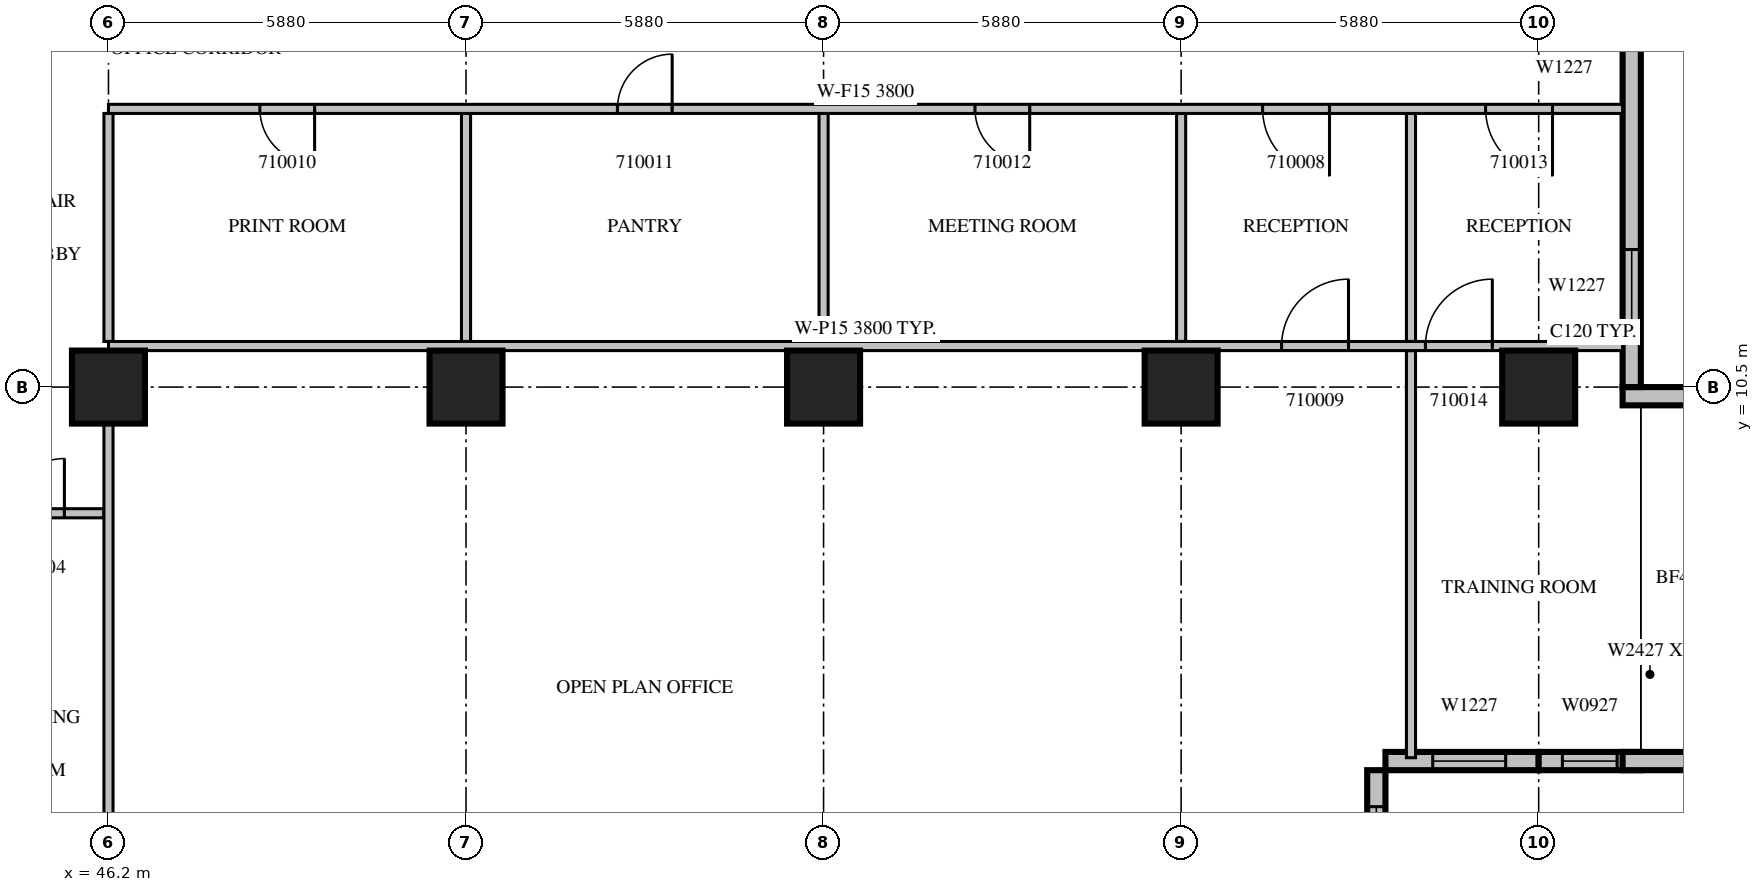
"""IFC4 building model, lengths in metres.
Left out: names, types, materials, properties, quantities, classifications, styles, units other than length and angle.
Written with IfcOpenShell. Run it as: python <this file> out.ifc"""

import sys

from ifc_helpers import new_model, si_unit, direction, frame, frame_2d, origin, origin_2d, place, context, subcontext, project, spatial, rectangle, extrude, source, transform, mapped, element, fill, save


model = new_model("IFC4")
c1 = context("Model", 3, precision=1e-05, world=origin(), true_north=direction((0.0, 1.0)))
c2 = subcontext(c1, "Body", "Model", "MODEL_VIEW")
j1 = project(units=[si_unit("LENGTHUNIT", "METRE"), si_unit("PLANEANGLEUNIT", "RADIAN")], contexts=[c1])
p1 = place(None, origin())
s1 = spatial("IfcSite", under=j1, at=p1, CompositionType="ELEMENT")
p2 = place(p1, origin())
s2 = spatial("IfcBuilding", under=s1, at=p2, CompositionType="ELEMENT")
p3 = place(p2, frame((0.0, 0.0, 53.1)))
s3 = spatial("IfcBuildingStorey", under=s2, at=p3, CompositionType="ELEMENT", Elevation=53.1)
m1 = source(origin(), c2, "Body", "SweptSolid", [
    extrude(rectangle(XDim=1.2, YDim=1.2, at=origin_2d()), origin(), (0.0, 0.0, 1.0), 4.2),
])
for number, where, z_axis, x_axis in (
    (1, (46.2, 10.5, 0.0), (0.0, 0.0, 1.0), (1.0, 0.0, 0.0)),
    (2, (52.08, 10.5, 0.0), (0.0, 0.0, 1.0), (1.0, 0.0, 0.0)),
    (3, (57.96, 10.5, 0.0), (0.0, 0.0, 1.0), (1.0, 0.0, 0.0)),
    (4, (63.84, 10.5, 0.0), (0.0, 0.0, 1.0), (1.0, 0.0, 0.0)),
    (5, (69.72, 10.5, 0.0), (0.0, 0.0, 1.0), (1.0, 0.0, 0.0)),
):
    element("IfcColumn", number, at=place(p3, frame(where, z_axis=z_axis, x_axis=x_axis)), inside=s3, PredefinedType="COLUMN", context=c2, shape_type="MappedRepresentation", body=[
        mapped(m1, transform((0.0, 0.0, 0.0), scale=1.0)),
    ])
m2 = source(origin(), c2, "Body", "SweptSolid", [
    extrude(rectangle(XDim=4.2, YDim=0.3, at=frame_2d((2.1, 0.0))), origin(), (0.0, 0.0, 1.0), 3.8),
])
p4 = place(p3, frame((67.05, 0.0, 0.0), z_axis=(0.0, 0.0, 1.0), x_axis=(0.0, 1.0, 0.0)))
e6 = element("IfcWall", 6, at=p4, inside=s3, PredefinedType="STANDARD", context=c2, shape_type="MappedRepresentation", body=[
    mapped(m2, transform((0.0, 0.0, 0.0), scale=1.0)),
])
m3 = source(origin(), c2, "Body", "SweptSolid", [
    extrude(rectangle(XDim=3.0, YDim=2.7, at=frame_2d((1.5, 1.35))), frame((0.0, 0.16, 0.0), z_axis=(0.0, -1.0, 0.0), x_axis=(1.0, 0.0, 0.0)), (0.0, 0.0, 1.0), 0.32),
])
p5 = place(p4, frame((0.6, 0.0, 0.6)))
e7 = element("IfcOpeningElement", 7, at=p5, cuts=e6, PredefinedType="OPENING", context=c2, shape_type="MappedRepresentation", body=[
    mapped(m3, transform((0.0, 0.0, 0.0), scale=1.0)),
])
m4 = source(origin(), c2, "Body", "SweptSolid", [
    extrude(rectangle(XDim=2.52, YDim=0.3, at=frame_2d((1.26, 0.0))), origin(), (0.0, 0.0, 1.0), 3.8),
])
p6 = place(p3, frame((67.2, 4.35, 0.0), z_axis=(0.0, 0.0, 1.0), x_axis=(1.0, 0.0, 0.0)))
e8 = element("IfcWall", 8, at=p6, inside=s3, PredefinedType="STANDARD", context=c2, shape_type="MappedRepresentation", body=[
    mapped(m4, transform((0.0, 0.0, 0.0), scale=1.0)),
])
m5 = source(origin(), c2, "Body", "SweptSolid", [
    extrude(rectangle(XDim=1.2, YDim=2.7, at=frame_2d((0.6, 1.35))), frame((0.0, 0.16, 0.0), z_axis=(0.0, -1.0, 0.0), x_axis=(1.0, 0.0, 0.0)), (0.0, 0.0, 1.0), 0.32),
])
p7 = place(p6, frame((0.777, 0.0, 0.6)))
e9 = element("IfcOpeningElement", 9, at=p7, cuts=e8, PredefinedType="OPENING", context=c2, shape_type="MappedRepresentation", body=[
    mapped(m5, transform((0.0, 0.0, 0.0), scale=1.0)),
])
m6 = source(origin(), c2, "Body", "SweptSolid", [
    extrude(rectangle(XDim=1.68, YDim=0.3, at=frame_2d((0.84, 0.0))), origin(), (0.0, 0.0, 1.0), 3.8),
])
p8 = place(p3, frame((69.72, 4.35, 0.0), z_axis=(0.0, 0.0, 1.0), x_axis=(1.0, 0.0, 0.0)))
e10 = element("IfcWall", 10, at=p8, inside=s3, PredefinedType="STANDARD", context=c2, shape_type="MappedRepresentation", body=[
    mapped(m6, transform((0.0, 0.0, 0.0), scale=1.0)),
])
m7 = source(origin(), c2, "Body", "SweptSolid", [
    extrude(rectangle(XDim=0.9, YDim=2.7, at=frame_2d((0.45, 1.35))), frame((0.0, 0.16, 0.0), z_axis=(0.0, -1.0, 0.0), x_axis=(1.0, 0.0, 0.0)), (0.0, 0.0, 1.0), 0.32),
])
p9 = place(p8, frame((0.39, 0.0, 0.6)))
e11 = element("IfcOpeningElement", 11, at=p9, cuts=e10, PredefinedType="OPENING", context=c2, shape_type="MappedRepresentation", body=[
    mapped(m7, transform((0.0, 0.0, 0.0), scale=1.0)),
])
m8 = source(origin(), c2, "Body", "SweptSolid", [
    extrude(rectangle(XDim=1.2, YDim=0.3, at=frame_2d((0.6, 0.0))), origin(), (0.0, 0.0, 1.0), 3.8),
])
for number, where, z_axis, x_axis in (
    (12, (71.1, 4.35, 0.0), (0.0, 0.0, 1.0), (1.0, 0.0, 0.0)),
    (13, (71.1, 10.35, 0.0), (0.0, 0.0, 1.0), (1.0, 0.0, 0.0)),
):
    element("IfcWall", number, at=place(p3, frame(where, z_axis=z_axis, x_axis=x_axis)), inside=s3, PredefinedType="STANDARD", context=c2, shape_type="MappedRepresentation", body=[
        mapped(m8, transform((0.0, 0.0, 0.0), scale=1.0)),
    ])
m9 = source(origin(), c2, "Body", "SweptSolid", [
    extrude(rectangle(XDim=6.3, YDim=0.3, at=frame_2d((3.15, 0.0))), origin(), (0.0, 0.0, 1.0), 3.8),
])
p10 = place(p3, frame((71.25, 10.5, 0.0), z_axis=(0.0, 0.0, 1.0), x_axis=(0.0, 1.0, 0.0)))
e14 = element("IfcWall", 14, at=p10, inside=s3, PredefinedType="STANDARD", context=c2, shape_type="MappedRepresentation", body=[
    mapped(m9, transform((0.0, 0.0, 0.0), scale=1.0)),
])
p11 = place(p10, frame((1.062, 0.0, 0.6)))
e15 = element("IfcOpeningElement", 15, at=p11, cuts=e14, PredefinedType="OPENING", context=c2, shape_type="MappedRepresentation", body=[
    mapped(m5, transform((0.0, 0.0, 0.0), scale=1.0)),
])
m10 = source(origin(), c2, "Body", "SweptSolid", [
    extrude(rectangle(XDim=2.2, YDim=0.15, at=frame_2d((1.1, 0.0))), origin(), (0.0, 0.0, 1.0), 3.8),
])
p12 = place(p3, frame((46.125, 8.425, 0.0), z_axis=(0.0, 0.0, 1.0), x_axis=(-1.0, 0.0, 0.0)))
e16 = element("IfcWall", 16, at=p12, inside=s3, PredefinedType="PARTITIONING", context=c2, shape_type="MappedRepresentation", body=[
    mapped(m10, transform((0.0, 0.0, 0.0), scale=1.0)),
])
m11 = source(origin(), c2, "Body", "SweptSolid", [
    extrude(rectangle(XDim=0.9, YDim=2.1, at=frame_2d((0.45, 1.05))), frame((0.0, 0.085, 0.0), z_axis=(0.0, -1.0, 0.0), x_axis=(1.0, 0.0, 0.0)), (0.0, 0.0, 1.0), 0.17),
])
p13 = place(p12, frame((0.65, 0.0, 0.0)))
e17 = element("IfcOpeningElement", 17, at=p13, cuts=e16, PredefinedType="OPENING", context=c2, shape_type="MappedRepresentation", body=[
    mapped(m11, transform((0.0, 0.0, 0.0), scale=1.0)),
])
m12 = source(origin(), c2, "Body", "SweptSolid", [
    extrude(rectangle(XDim=3.75, YDim=0.15, at=frame_2d((1.875, 0.0))), origin(), (0.0, 0.0, 1.0), 3.8),
])
for number, where, z_axis, x_axis in (
    (18, (52.08, 11.25, 0.0), (0.0, 0.0, 1.0), (0.0, 1.0, 0.0)),
    (19, (57.96, 11.25, 0.0), (0.0, 0.0, 1.0), (0.0, 1.0, 0.0)),
    (20, (63.84, 11.25, 0.0), (0.0, 0.0, 1.0), (0.0, 1.0, 0.0)),
):
    element("IfcWall", number, at=place(p3, frame(where, z_axis=z_axis, x_axis=x_axis)), inside=s3, PredefinedType="PARTITIONING", context=c2, shape_type="MappedRepresentation", body=[
        mapped(m12, transform((0.0, 0.0, 0.0), scale=1.0)),
    ])
m13 = source(origin(), c2, "Body", "SweptSolid", [
    extrude(rectangle(XDim=8.702, YDim=0.15, at=frame_2d((4.351, 0.0))), origin(), (0.0, 0.0, 1.0), 3.8),
])
p14 = place(p3, frame((46.2, 1.199, 0.0), z_axis=(0.0, 0.0, 1.0), x_axis=(0.0, 1.0, 0.0)))
e21 = element("IfcWall", 21, at=p14, inside=s3, PredefinedType="PARTITIONING", context=c2, shape_type="MappedRepresentation", body=[
    mapped(m13, transform((0.0, 0.0, 0.0), scale=1.0)),
])
p15 = place(p3, frame((46.2, 11.25, 0.0), z_axis=(0.0, 0.0, 1.0), x_axis=(0.0, 1.0, 0.0)))
e22 = element("IfcWall", 22, at=p15, inside=s3, PredefinedType="PARTITIONING", context=c2, shape_type="MappedRepresentation", body=[
    mapped(m12, transform((0.0, 0.0, 0.0), scale=1.0)),
])
m14 = source(origin(), c2, "Body", "SweptSolid", [
    extrude(rectangle(XDim=6.695, YDim=0.15, at=frame_2d((3.348, 0.0))), origin(), (0.0, 0.0, 1.0), 3.8),
])
p16 = place(p3, frame((67.62, 4.405, 0.0), z_axis=(0.0, 0.0, 1.0), x_axis=(0.0, 1.0, 0.0)))
e23 = element("IfcWall", 23, at=p16, inside=s3, PredefinedType="PARTITIONING", context=c2, shape_type="MappedRepresentation", body=[
    mapped(m14, transform((0.0, 0.0, 0.0), scale=1.0)),
])
p17 = place(p3, frame((67.62, 11.25, 0.0), z_axis=(0.0, 0.0, 1.0), x_axis=(0.0, 1.0, 0.0)))
e24 = element("IfcWall", 24, at=p17, inside=s3, PredefinedType="PARTITIONING", context=c2, shape_type="MappedRepresentation", body=[
    mapped(m12, transform((0.0, 0.0, 0.0), scale=1.0)),
])
m15 = source(origin(), c2, "Body", "SweptSolid", [
    extrude(rectangle(XDim=24.9, YDim=0.15, at=frame_2d((12.45, 0.0))), origin(), (0.0, 0.0, 1.0), 3.8),
])
p18 = place(p3, frame((71.1, 11.175, 0.0), z_axis=(0.0, 0.0, 1.0), x_axis=(-1.0, 0.0, 0.0)))
e25 = element("IfcWall", 25, at=p18, inside=s3, PredefinedType="PARTITIONING", context=c2, shape_type="MappedRepresentation", body=[
    mapped(m15, transform((0.0, 0.0, 0.0), scale=1.0)),
])
m16 = source(origin(), c2, "Body", "SweptSolid", [
    extrude(rectangle(XDim=1.1, YDim=2.1, at=frame_2d((0.55, 1.05))), frame((0.0, 0.085, 0.0), z_axis=(0.0, -1.0, 0.0), x_axis=(1.0, 0.0, 0.0)), (0.0, 0.0, 1.0), 0.17),
])
p19 = place(p18, frame((4.508, 0.0, 0.0)))
e26 = element("IfcOpeningElement", 26, at=p19, cuts=e25, PredefinedType="OPENING", context=c2, shape_type="MappedRepresentation", body=[
    mapped(m16, transform((0.0, 0.0, 0.0), scale=1.0)),
])
p20 = place(p18, frame((2.143, 0.0, 0.0)))
e27 = element("IfcOpeningElement", 27, at=p20, cuts=e25, PredefinedType="OPENING", context=c2, shape_type="MappedRepresentation", body=[
    mapped(m16, transform((0.0, 0.0, 0.0), scale=1.0)),
])
p21 = place(p3, frame((71.1, 15.075, 0.0), z_axis=(0.0, 0.0, 1.0), x_axis=(-1.0, 0.0, 0.0)))
e28 = element("IfcWall", 28, at=p21, inside=s3, PredefinedType="PARTITIONING", context=c2, shape_type="MappedRepresentation", body=[
    mapped(m15, transform((0.0, 0.0, 0.0), scale=1.0)),
])
p22 = place(p21, frame((4.82, 0.0, 0.0)))
e29 = element("IfcOpeningElement", 29, at=p22, cuts=e28, PredefinedType="OPENING", context=c2, shape_type="MappedRepresentation", body=[
    mapped(m16, transform((0.0, 0.0, 0.0), scale=1.0)),
])
p23 = place(p21, frame((21.51, 0.0, 0.0)))
e30 = element("IfcOpeningElement", 30, at=p23, cuts=e28, PredefinedType="OPENING", context=c2, shape_type="MappedRepresentation", body=[
    mapped(m11, transform((0.0, 0.0, 0.0), scale=1.0)),
])
p24 = place(p21, frame((15.63, 0.0, 0.0)))
e31 = element("IfcOpeningElement", 31, at=p24, cuts=e28, PredefinedType="OPENING", context=c2, shape_type="MappedRepresentation", body=[
    mapped(m11, transform((0.0, 0.0, 0.0), scale=1.0)),
])
p25 = place(p21, frame((9.75, 0.0, 0.0)))
e32 = element("IfcOpeningElement", 32, at=p25, cuts=e28, PredefinedType="OPENING", context=c2, shape_type="MappedRepresentation", body=[
    mapped(m11, transform((0.0, 0.0, 0.0), scale=1.0)),
])
p26 = place(p21, frame((1.153, 0.0, 0.0)))
e33 = element("IfcOpeningElement", 33, at=p26, cuts=e28, PredefinedType="OPENING", context=c2, shape_type="MappedRepresentation", body=[
    mapped(m16, transform((0.0, 0.0, 0.0), scale=1.0)),
])
m17 = source(origin(), c2, "Body", "SweptSolid", [
    extrude(rectangle(XDim=3.0, YDim=2.7, at=frame_2d((1.5, 1.35))), frame((0.0, 0.03, 0.0), z_axis=(0.0, -1.0, 0.0), x_axis=(1.0, 0.0, 0.0)), (0.0, 0.0, 1.0), 0.06),
])
p27 = place(p5, origin())
e34 = element("IfcWindow", 34, at=p27, inside=s3, PartitioningType="SINGLE_PANEL", PredefinedType="WINDOW", context=c2, shape_type="MappedRepresentation", body=[
    mapped(m17, transform((0.0, 0.0, 0.0), scale=1.0)),
])
fill(e7, e34)
m18 = source(origin(), c2, "Body", "SweptSolid", [
    extrude(rectangle(XDim=1.2, YDim=2.7, at=frame_2d((0.6, 1.35))), frame((0.0, 0.03, 0.0), z_axis=(0.0, -1.0, 0.0), x_axis=(1.0, 0.0, 0.0)), (0.0, 0.0, 1.0), 0.06),
])
p28 = place(p7, origin())
e35 = element("IfcWindow", 35, at=p28, inside=s3, PartitioningType="SINGLE_PANEL", PredefinedType="WINDOW", context=c2, shape_type="MappedRepresentation", body=[
    mapped(m18, transform((0.0, 0.0, 0.0), scale=1.0)),
])
fill(e9, e35)
m19 = source(origin(), c2, "Body", "SweptSolid", [
    extrude(rectangle(XDim=0.9, YDim=2.7, at=frame_2d((0.45, 1.35))), frame((0.0, 0.03, 0.0), z_axis=(0.0, -1.0, 0.0), x_axis=(1.0, 0.0, 0.0)), (0.0, 0.0, 1.0), 0.06),
])
p29 = place(p9, origin())
e36 = element("IfcWindow", 36, at=p29, inside=s3, PartitioningType="SINGLE_PANEL", PredefinedType="WINDOW", context=c2, shape_type="MappedRepresentation", body=[
    mapped(m19, transform((0.0, 0.0, 0.0), scale=1.0)),
])
fill(e11, e36)
p30 = place(p11, origin())
e37 = element("IfcWindow", 37, at=p30, inside=s3, PartitioningType="SINGLE_PANEL", PredefinedType="WINDOW", context=c2, shape_type="MappedRepresentation", body=[
    mapped(m18, transform((0.0, 0.0, 0.0), scale=1.0)),
])
fill(e15, e37)
m20 = source(origin(), c2, "Body", "SweptSolid", [
    extrude(rectangle(XDim=0.9, YDim=2.1, at=frame_2d((0.45, 1.05))), frame((0.0, 0.025, 0.0), z_axis=(0.0, -1.0, 0.0), x_axis=(1.0, 0.0, 0.0)), (0.0, 0.0, 1.0), 0.05),
])
p31 = place(p13, origin())
e38 = element("IfcDoor", 38, at=p31, inside=s3, OperationType="SINGLE_SWING_RIGHT", PredefinedType="DOOR", context=c2, shape_type="MappedRepresentation", body=[
    mapped(m20, transform((0.0, 0.0, 0.0), scale=1.0)),
])
fill(e17, e38)
m21 = source(origin(), c2, "Body", "SweptSolid", [
    extrude(rectangle(XDim=1.1, YDim=2.1, at=frame_2d((0.55, 1.05))), frame((0.0, 0.025, 0.0), z_axis=(0.0, -1.0, 0.0), x_axis=(1.0, 0.0, 0.0)), (0.0, 0.0, 1.0), 0.05),
])
p32 = place(p22, origin())
e39 = element("IfcDoor", 39, at=p32, inside=s3, OperationType="SINGLE_SWING_LEFT", PredefinedType="DOOR", context=c2, shape_type="MappedRepresentation", body=[
    mapped(m21, transform((0.0, 0.0, 0.0), scale=1.0)),
])
fill(e29, e39)
p33 = place(p19, origin())
e40 = element("IfcDoor", 40, at=p33, inside=s3, OperationType="SINGLE_SWING_RIGHT", PredefinedType="DOOR", context=c2, shape_type="MappedRepresentation", body=[
    mapped(m21, transform((0.0, 0.0, 0.0), scale=1.0)),
])
fill(e26, e40)
p34 = place(p23, origin())
e41 = element("IfcDoor", 41, at=p34, inside=s3, OperationType="SINGLE_SWING_LEFT", PredefinedType="DOOR", context=c2, shape_type="MappedRepresentation", body=[
    mapped(m20, transform((0.0, 0.0, 0.0), scale=1.0)),
])
fill(e30, e41)
p35 = place(p24, origin())
e42 = element("IfcDoor", 42, at=p35, inside=s3, OperationType="SINGLE_SWING_RIGHT", PredefinedType="DOOR", context=c2, shape_type="MappedRepresentation", body=[
    mapped(m20, transform((0.0, 0.0, 0.0), scale=1.0)),
])
fill(e31, e42)
p36 = place(p25, origin())
e43 = element("IfcDoor", 43, at=p36, inside=s3, OperationType="SINGLE_SWING_LEFT", PredefinedType="DOOR", context=c2, shape_type="MappedRepresentation", body=[
    mapped(m20, transform((0.0, 0.0, 0.0), scale=1.0)),
])
fill(e32, e43)
p37 = place(p26, origin())
e44 = element("IfcDoor", 44, at=p37, inside=s3, OperationType="SINGLE_SWING_LEFT", PredefinedType="DOOR", context=c2, shape_type="MappedRepresentation", body=[
    mapped(m21, transform((0.0, 0.0, 0.0), scale=1.0)),
])
fill(e33, e44)
p38 = place(p20, origin())
e45 = element("IfcDoor", 45, at=p38, inside=s3, OperationType="SINGLE_SWING_RIGHT", PredefinedType="DOOR", context=c2, shape_type="MappedRepresentation", body=[
    mapped(m21, transform((0.0, 0.0, 0.0), scale=1.0)),
])
fill(e27, e45)
save(model, sys.argv[1])
